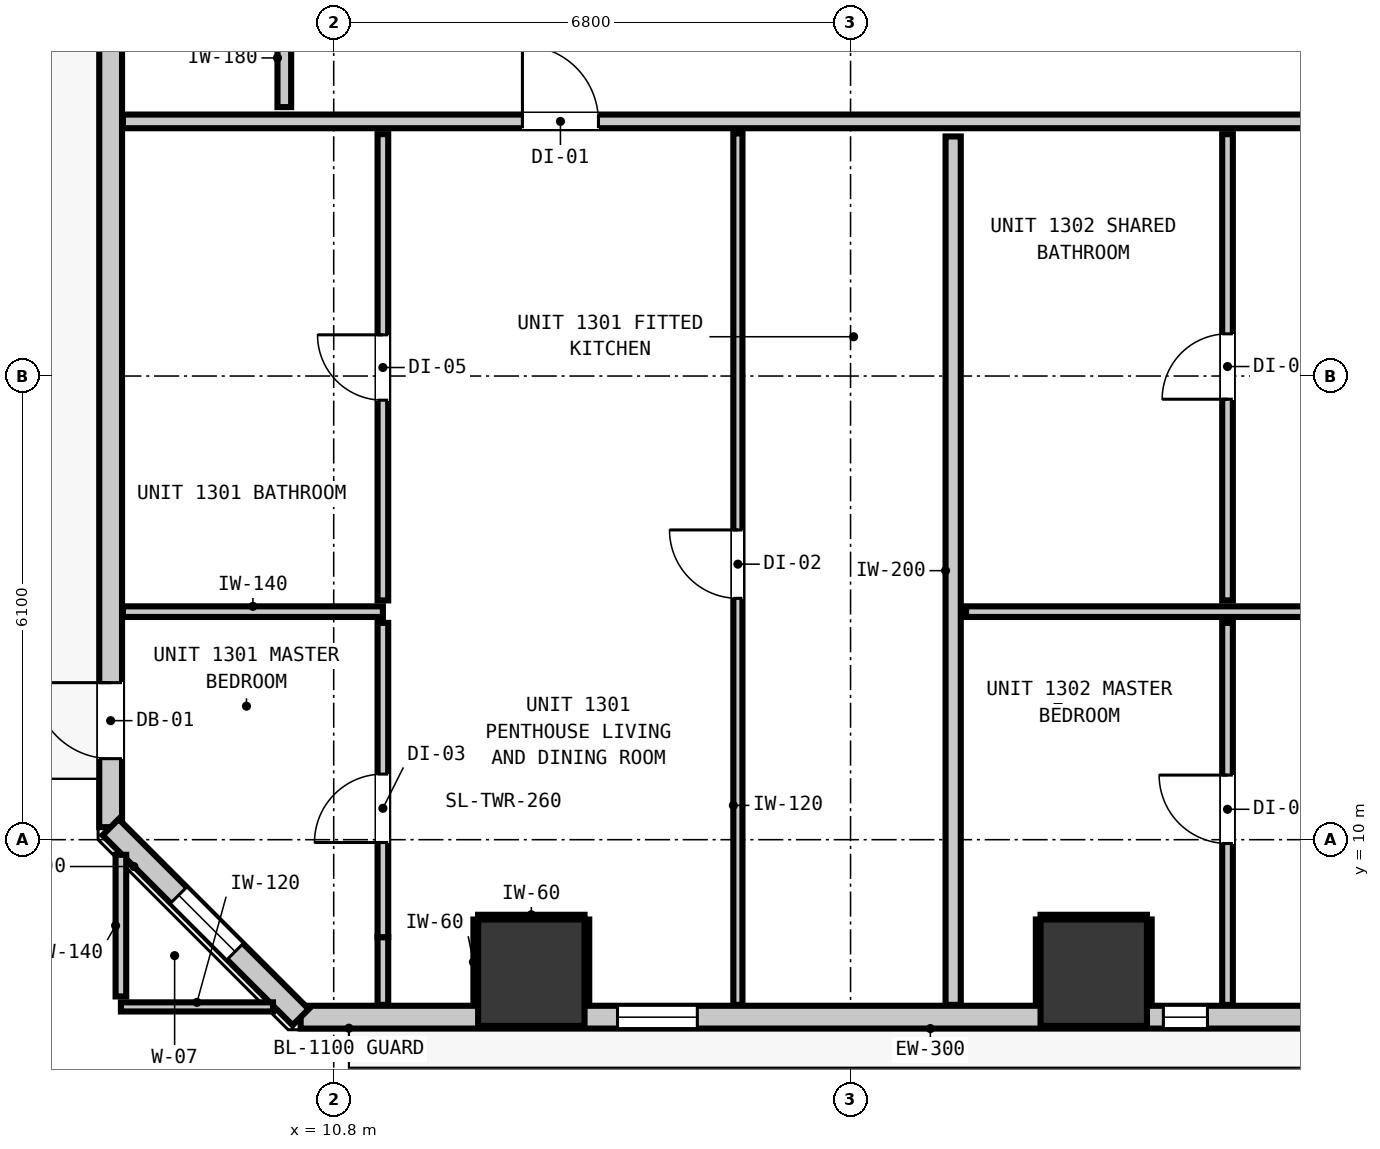
"""IFC4 building model, lengths in metres.
Left out: names, types, materials, properties, quantities, classifications, styles, units other than length and angle.
Written with IfcOpenShell. Run it as: python <this file> out.ifc"""

import sys

from ifc_helpers import new_model, si_unit, direction, frame, frame_2d, origin, origin_2d, place, context, subcontext, project, spatial, rectangle, extrude, element, fill, save


model = new_model("IFC4")
c1 = context("Model", 3, precision=1e-05, world=origin(), true_north=direction((0.0, 1.0)))
c2 = subcontext(c1, "Body", "Model", "MODEL_VIEW")
j1 = project(units=[si_unit("LENGTHUNIT", "METRE"), si_unit("PLANEANGLEUNIT", "RADIAN")], contexts=[c1])
p1 = place(None, origin())
s1 = spatial("IfcSite", under=j1, at=p1, CompositionType="ELEMENT")
p2 = place(p1, origin())
s2 = spatial("IfcBuilding", under=s1, at=p2, CompositionType="ELEMENT")
p3 = place(p2, frame((0.0, 0.0, 48.56)))
s3 = spatial("IfcBuildingStorey", under=s2, at=p3, CompositionType="ELEMENT", Elevation=48.56)
for number, where, z_axis, x_axis in (
    (1, (13.4, 8.25, 0.0), (0.0, 0.0, 1.0), (1.0, 0.0, 0.0)),
    (2, (20.8, 8.25, 0.0), (0.0, 0.0, 1.0), (1.0, 0.0, 0.0)),
):
    element("IfcColumn", number, at=place(p3, frame(where, z_axis=z_axis, x_axis=x_axis)), inside=s3, PredefinedType="COLUMN", context=c2, shape_type="SweptSolid", body=[
        extrude(rectangle(XDim=1.4, YDim=1.4, at=origin_2d()), origin(), (0.0, 0.0, 1.0), 3.32),
    ])
p4 = place(p3, frame((7.865, 10.165, 0.0), z_axis=(0.0, 0.0, 1.0), x_axis=(0.0, 1.0, 0.0)))
e3 = element("IfcWall", 3, at=p4, inside=s3, PredefinedType="STANDARD", context=c2, shape_type="SweptSolid", body=[
    extrude(rectangle(XDim=34.67, YDim=0.3, at=frame_2d((17.335, 0.0))), origin(), (0.0, 0.0, 1.0), 3.06),
])
p5 = place(p4, frame((0.901, 0.0, 0.0)))
e4 = element("IfcOpeningElement", 4, at=p5, cuts=e3, PredefinedType="OPENING", context=c2, shape_type="SweptSolid", body=[
    extrude(rectangle(XDim=1.0, YDim=2.15, at=frame_2d((0.5, 1.075))), frame((0.0, 0.16, 0.0), z_axis=(0.0, -1.0, 0.0), x_axis=(1.0, 0.0, 0.0)), (0.0, 0.0, 1.0), 0.32),
])
p6 = place(p3, frame((47.835, 7.665, 0.0), z_axis=(0.0, 0.0, 1.0), x_axis=(-1.0, 0.0, 0.0)))
e5 = element("IfcWall", 5, at=p6, inside=s3, PredefinedType="STANDARD", context=c2, shape_type="SweptSolid", body=[
    extrude(rectangle(XDim=37.47, YDim=0.3, at=frame_2d((18.735, 0.0))), origin(), (0.0, 0.0, 1.0), 3.06),
])
p7 = place(p6, frame((2.301, 0.0, 0.0)))
e6 = element("IfcOpeningElement", 6, at=p7, cuts=e5, PredefinedType="OPENING", context=c2, shape_type="SweptSolid", body=[
    extrude(rectangle(XDim=1.0, YDim=2.15, at=frame_2d((0.5, 1.075))), frame((0.0, 0.16, 0.0), z_axis=(0.0, -1.0, 0.0), x_axis=(1.0, 0.0, 0.0)), (0.0, 0.0, 1.0), 0.32),
])
p8 = place(p6, frame((32.251, 0.0, 0.85)))
e7 = element("IfcOpeningElement", 7, at=p8, cuts=e5, PredefinedType="OPENING", context=c2, shape_type="SweptSolid", body=[
    extrude(rectangle(XDim=1.05, YDim=1.65, at=frame_2d((0.525, 0.825))), frame((0.0, 0.16, 0.0), z_axis=(0.0, -1.0, 0.0), x_axis=(1.0, 0.0, 0.0)), (0.0, 0.0, 1.0), 0.32),
])
p9 = place(p6, frame((21.329, 0.0, 0.85)))
e8 = element("IfcOpeningElement", 8, at=p9, cuts=e5, PredefinedType="OPENING", context=c2, shape_type="SweptSolid", body=[
    extrude(rectangle(XDim=1.8, YDim=1.9, at=frame_2d((0.9, 0.95))), frame((0.0, 0.16, 0.0), z_axis=(0.0, -1.0, 0.0), x_axis=(1.0, 0.0, 0.0)), (0.0, 0.0, 1.0), 0.32),
])
p10 = place(p6, frame((25.539, 0.0, 0.85)))
e9 = element("IfcOpeningElement", 9, at=p10, cuts=e5, PredefinedType="OPENING", context=c2, shape_type="SweptSolid", body=[
    extrude(rectangle(XDim=0.58, YDim=1.5, at=frame_2d((0.29, 0.75))), frame((0.0, 0.16, 0.0), z_axis=(0.0, -1.0, 0.0), x_axis=(1.0, 0.0, 0.0)), (0.0, 0.0, 1.0), 0.32),
])
p11 = place(p6, frame((14.135, 0.0, 0.85)))
e10 = element("IfcOpeningElement", 10, at=p11, cuts=e5, PredefinedType="OPENING", context=c2, shape_type="SweptSolid", body=[
    extrude(rectangle(XDim=1.8, YDim=1.9, at=frame_2d((0.9, 0.95))), frame((0.0, 0.16, 0.0), z_axis=(0.0, -1.0, 0.0), x_axis=(1.0, 0.0, 0.0)), (0.0, 0.0, 1.0), 0.32),
])
p12 = place(p6, frame((5.562, 0.0, 0.85)))
e11 = element("IfcOpeningElement", 11, at=p12, cuts=e5, PredefinedType="OPENING", context=c2, shape_type="SweptSolid", body=[
    extrude(rectangle(XDim=1.8, YDim=1.9, at=frame_2d((0.9, 0.95))), frame((0.0, 0.16, 0.0), z_axis=(0.0, -1.0, 0.0), x_axis=(1.0, 0.0, 0.0)), (0.0, 0.0, 1.0), 0.32),
])
p13 = place(p6, frame((9.839, 0.0, 0.85)))
e12 = element("IfcOpeningElement", 12, at=p13, cuts=e5, PredefinedType="OPENING", context=c2, shape_type="SweptSolid", body=[
    extrude(rectangle(XDim=0.58, YDim=1.5, at=frame_2d((0.29, 0.75))), frame((0.0, 0.16, 0.0), z_axis=(0.0, -1.0, 0.0), x_axis=(1.0, 0.0, 0.0)), (0.0, 0.0, 1.0), 0.32),
])
p14 = place(p6, frame((0.364, 0.0, 0.85)))
e13 = element("IfcOpeningElement", 13, at=p14, cuts=e5, PredefinedType="OPENING", context=c2, shape_type="SweptSolid", body=[
    extrude(rectangle(XDim=1.05, YDim=1.65, at=frame_2d((0.525, 0.825))), frame((0.0, 0.16, 0.0), z_axis=(0.0, -1.0, 0.0), x_axis=(1.0, 0.0, 0.0)), (0.0, 0.0, 1.0), 0.32),
])
p15 = place(p3, frame((10.365, 7.665, 0.0), z_axis=(0.0, 0.0, 1.0), x_axis=(-0.707106781187, 0.707106781187, 0.0)))
e14 = element("IfcWall", 14, at=p15, inside=s3, PredefinedType="STANDARD", context=c2, shape_type="SweptSolid", body=[
    extrude(rectangle(XDim=3.536, YDim=0.3, at=frame_2d((1.768, 0.0))), origin(), (0.0, 0.0, 1.0), 3.06),
])
p16 = place(p15, frame((1.22, 0.0, 0.85)))
e15 = element("IfcOpeningElement", 15, at=p16, cuts=e14, PredefinedType="OPENING", context=c2, shape_type="SweptSolid", body=[
    extrude(rectangle(XDim=1.05, YDim=1.65, at=frame_2d((0.525, 0.825))), frame((0.0, 0.16, 0.0), z_axis=(0.0, -1.0, 0.0), x_axis=(1.0, 0.0, 0.0)), (0.0, 0.0, 1.0), 0.32),
])
p17 = place(p3, frame((8.027, 19.45, 0.0), z_axis=(0.0, 0.0, 1.0), x_axis=(1.0, 0.0, 0.0)))
e16 = element("IfcWall", 16, at=p17, inside=s3, PredefinedType="PARTITIONING", context=c2, shape_type="SweptSolid", body=[
    extrude(rectangle(XDim=42.146, YDim=0.18, at=frame_2d((21.073, 0.0))), origin(), (0.0, 0.0, 1.0), 3.06),
])
p18 = place(p17, frame((5.256, 0.0, 0.0)))
e17 = element("IfcOpeningElement", 17, at=p18, cuts=e16, PredefinedType="OPENING", context=c2, shape_type="SweptSolid", body=[
    extrude(rectangle(XDim=1.0, YDim=2.15, at=frame_2d((0.5, 1.075))), frame((0.0, 0.1, 0.0), z_axis=(0.0, -1.0, 0.0), x_axis=(1.0, 0.0, 0.0)), (0.0, 0.0, 1.0), 0.2),
])
p19 = place(p17, frame((18.169, 0.0, 0.0)))
e18 = element("IfcOpeningElement", 18, at=p19, cuts=e16, PredefinedType="OPENING", context=c2, shape_type="SweptSolid", body=[
    extrude(rectangle(XDim=1.0, YDim=2.15, at=frame_2d((0.5, 1.075))), frame((0.0, 0.1, 0.0), z_axis=(0.0, -1.0, 0.0), x_axis=(1.0, 0.0, 0.0)), (0.0, 0.0, 1.0), 0.2),
])
p20 = place(p17, frame((33.653, 0.0, 0.0)))
e19 = element("IfcOpeningElement", 19, at=p20, cuts=e16, PredefinedType="OPENING", context=c2, shape_type="SweptSolid", body=[
    extrude(rectangle(XDim=1.0, YDim=2.15, at=frame_2d((0.5, 1.075))), frame((0.0, 0.1, 0.0), z_axis=(0.0, -1.0, 0.0), x_axis=(1.0, 0.0, 0.0)), (0.0, 0.0, 1.0), 0.2),
])
p21 = place(p3, frame((8.027, 13.0, 0.0), z_axis=(0.0, 0.0, 1.0), x_axis=(1.0, 0.0, 0.0)))
e20 = element("IfcWall", 20, at=p21, inside=s3, PredefinedType="PARTITIONING", context=c2, shape_type="SweptSolid", body=[
    extrude(rectangle(XDim=3.42, YDim=0.14, at=frame_2d((1.71, 0.0))), origin(), (0.0, 0.0, 1.0), 3.06),
])
p22 = place(p3, frame((19.12, 13.0, 0.0), z_axis=(0.0, 0.0, 1.0), x_axis=(1.0, 0.0, 0.0)))
e21 = element("IfcWall", 21, at=p22, inside=s3, PredefinedType="PARTITIONING", context=c2, shape_type="SweptSolid", body=[
    extrude(rectangle(XDim=31.053, YDim=0.14, at=frame_2d((15.526, 0.0))), origin(), (0.0, 0.0, 1.0), 3.06),
])
p23 = place(p22, frame((7.126, 0.0, 0.0)))
e22 = element("IfcOpeningElement", 22, at=p23, cuts=e21, PredefinedType="OPENING", context=c2, shape_type="SweptSolid", body=[
    extrude(rectangle(XDim=0.9, YDim=2.1, at=frame_2d((0.45, 1.05))), frame((0.0, 0.08, 0.0), z_axis=(0.0, -1.0, 0.0), x_axis=(1.0, 0.0, 0.0)), (0.0, 0.0, 1.0), 0.16),
])
p24 = place(p22, frame((22.609, 0.0, 0.0)))
e23 = element("IfcOpeningElement", 23, at=p24, cuts=e21, PredefinedType="OPENING", context=c2, shape_type="SweptSolid", body=[
    extrude(rectangle(XDim=0.9, YDim=2.1, at=frame_2d((0.45, 1.05))), frame((0.0, 0.08, 0.0), z_axis=(0.0, -1.0, 0.0), x_axis=(1.0, 0.0, 0.0)), (0.0, 0.0, 1.0), 0.16),
])
p25 = place(p3, frame((8.0, 7.8, 0.0), z_axis=(0.0, 0.0, 1.0), x_axis=(1.0, 0.0, 0.0)))
e24 = element("IfcWall", 24, at=p25, inside=s3, PredefinedType="PARTITIONING", context=c2, shape_type="SweptSolid", body=[
    extrude(rectangle(XDim=2.001, YDim=0.12, at=frame_2d((1.0, 0.0))), origin(), (0.0, 0.0, 1.0), 3.06),
])
p26 = place(p3, frame((18.95, 7.827, 0.0), z_axis=(0.0, 0.0, 1.0), x_axis=(0.0, 1.0, 0.0)))
e25 = element("IfcWall", 25, at=p26, inside=s3, PredefinedType="PARTITIONING", context=c2, shape_type="SweptSolid", body=[
    extrude(rectangle(XDim=11.425, YDim=0.2, at=frame_2d((5.712, 0.0))), origin(), (0.0, 0.0, 1.0), 3.06),
])
p27 = place(p3, frame((10.15, 19.638, 0.0), z_axis=(0.0, 0.0, 1.0), x_axis=(0.0, 1.0, 0.0)))
e26 = element("IfcWall", 26, at=p27, inside=s3, PredefinedType="PARTITIONING", context=c2, shape_type="SweptSolid", body=[
    extrude(rectangle(XDim=1.294, YDim=0.18, at=frame_2d((0.647, 0.0))), origin(), (0.0, 0.0, 1.0), 3.06),
])
p28 = place(p3, frame((8.0, 7.938, 0.0), z_axis=(0.0, 0.0, 1.0), x_axis=(0.0, 1.0, 0.0)))
e27 = element("IfcWall", 27, at=p28, inside=s3, PredefinedType="PARTITIONING", context=c2, shape_type="SweptSolid", body=[
    extrude(rectangle(XDim=1.863, YDim=0.14, at=frame_2d((0.932, 0.0))), origin(), (0.0, 0.0, 1.0), 3.06),
])
p29 = place(p3, frame((11.447, 7.827, 0.0), z_axis=(0.0, 0.0, 1.0), x_axis=(0.0, 1.0, 0.0)))
e28 = element("IfcWall", 28, at=p29, inside=s3, PredefinedType="PARTITIONING", context=c2, shape_type="SweptSolid", body=[
    extrude(rectangle(XDim=0.891, YDim=0.14, at=frame_2d((0.446, 0.0))), origin(), (0.0, 0.0, 1.0), 3.06),
])
p30 = place(p3, frame((11.447, 8.718, 0.0), z_axis=(0.0, 0.0, 1.0), x_axis=(0.0, 1.0, 0.0)))
e29 = element("IfcWall", 29, at=p30, inside=s3, PredefinedType="PARTITIONING", context=c2, shape_type="SweptSolid", body=[
    extrude(rectangle(XDim=4.134, YDim=0.14, at=frame_2d((2.067, 0.0))), origin(), (0.0, 0.0, 1.0), 2.445),
])
p31 = place(p30, frame((1.245, 0.0, 0.0)))
e30 = element("IfcOpeningElement", 30, at=p31, cuts=e29, PredefinedType="OPENING", context=c2, shape_type="SweptSolid", body=[
    extrude(rectangle(XDim=0.9, YDim=2.1, at=frame_2d((0.45, 1.05))), frame((0.0, 0.08, 0.0), z_axis=(0.0, -1.0, 0.0), x_axis=(1.0, 0.0, 0.0)), (0.0, 0.0, 1.0), 0.16),
])
p32 = place(p3, frame((11.447, 13.148, 0.0), z_axis=(0.0, 0.0, 1.0), x_axis=(0.0, 1.0, 0.0)))
e31 = element("IfcWall", 31, at=p32, inside=s3, PredefinedType="PARTITIONING", context=c2, shape_type="SweptSolid", body=[
    extrude(rectangle(XDim=6.134, YDim=0.14, at=frame_2d((3.067, 0.0))), origin(), (0.0, 0.0, 1.0), 2.445),
])
p33 = place(p32, frame((2.634, 0.0, 0.0)))
e32 = element("IfcOpeningElement", 32, at=p33, cuts=e31, PredefinedType="OPENING", context=c2, shape_type="SweptSolid", body=[
    extrude(rectangle(XDim=0.86, YDim=2.02, at=frame_2d((0.43, 1.01))), frame((0.0, 0.08, 0.0), z_axis=(0.0, -1.0, 0.0), x_axis=(1.0, 0.0, 0.0)), (0.0, 0.0, 1.0), 0.16),
])
p34 = place(p3, frame((22.56, 7.827, 0.0), z_axis=(0.0, 0.0, 1.0), x_axis=(0.0, 1.0, 0.0)))
e33 = element("IfcWall", 33, at=p34, inside=s3, PredefinedType="PARTITIONING", context=c2, shape_type="SweptSolid", body=[
    extrude(rectangle(XDim=5.025, YDim=0.14, at=frame_2d((2.513, 0.0))), origin(), (0.0, 0.0, 1.0), 3.06),
])
p35 = place(p34, frame((2.123, 0.0, 0.0)))
e34 = element("IfcOpeningElement", 34, at=p35, cuts=e33, PredefinedType="OPENING", context=c2, shape_type="SweptSolid", body=[
    extrude(rectangle(XDim=0.9, YDim=2.1, at=frame_2d((0.45, 1.05))), frame((0.0, 0.08, 0.0), z_axis=(0.0, -1.0, 0.0), x_axis=(1.0, 0.0, 0.0)), (0.0, 0.0, 1.0), 0.16),
])
p36 = place(p3, frame((22.56, 13.148, 0.0), z_axis=(0.0, 0.0, 1.0), x_axis=(0.0, 1.0, 0.0)))
e35 = element("IfcWall", 35, at=p36, inside=s3, PredefinedType="PARTITIONING", context=c2, shape_type="SweptSolid", body=[
    extrude(rectangle(XDim=6.134, YDim=0.14, at=frame_2d((3.067, 0.0))), origin(), (0.0, 0.0, 1.0), 3.06),
])
p37 = place(p36, frame((2.647, 0.0, 0.0)))
e36 = element("IfcOpeningElement", 36, at=p37, cuts=e35, PredefinedType="OPENING", context=c2, shape_type="SweptSolid", body=[
    extrude(rectangle(XDim=0.86, YDim=2.02, at=frame_2d((0.43, 1.01))), frame((0.0, 0.08, 0.0), z_axis=(0.0, -1.0, 0.0), x_axis=(1.0, 0.0, 0.0)), (0.0, 0.0, 1.0), 0.16),
])
p38 = place(p3, frame((16.118, 7.827, 0.0), z_axis=(0.0, 0.0, 1.0), x_axis=(0.0, 1.0, 0.0)))
e37 = element("IfcWall", 37, at=p38, inside=s3, PredefinedType="PARTITIONING", context=c2, shape_type="SweptSolid", body=[
    extrude(rectangle(XDim=11.465, YDim=0.12, at=frame_2d((5.732, 0.0))), origin(), (0.0, 0.0, 1.0), 3.06),
])
p39 = place(p38, frame((5.348, 0.0, 0.0)))
e38 = element("IfcOpeningElement", 38, at=p39, cuts=e37, PredefinedType="OPENING", context=c2, shape_type="SweptSolid", body=[
    extrude(rectangle(XDim=0.9, YDim=2.1, at=frame_2d((0.45, 1.05))), frame((0.0, 0.07, 0.0), z_axis=(0.0, -1.0, 0.0), x_axis=(1.0, 0.0, 0.0)), (0.0, 0.0, 1.0), 0.14),
])
p40 = place(p3, frame((12.7, 8.982, 0.0), z_axis=(0.0, 0.0, 1.0), x_axis=(1.0, 0.0, 0.0)))
e39 = element("IfcWall", 39, at=p40, inside=s3, PredefinedType="PARTITIONING", context=c2, shape_type="SweptSolid", body=[
    extrude(rectangle(XDim=1.4, YDim=0.06, at=frame_2d((0.7, 0.0))), origin(), (0.0, 0.0, 1.0), 1.45),
])
for number, where, z_axis, x_axis in (
    (40, (12.668, 7.83, 0.0), (0.0, 0.0, 1.0), (0.0, 1.0, 0.0)),
    (41, (14.132, 7.83, 0.0), (0.0, 0.0, 1.0), (0.0, 1.0, 0.0)),
):
    element("IfcWall", number, at=place(p3, frame(where, z_axis=z_axis, x_axis=x_axis)), inside=s3, PredefinedType="PARTITIONING", context=c2, shape_type="SweptSolid", body=[
        extrude(rectangle(XDim=1.12, YDim=0.06, at=frame_2d((0.56, 0.0))), origin(), (0.0, 0.0, 1.0), 1.45),
    ])
p41 = place(p3, frame((20.1, 8.982, 0.0), z_axis=(0.0, 0.0, 1.0), x_axis=(1.0, 0.0, 0.0)))
e42 = element("IfcWall", 42, at=p41, inside=s3, PredefinedType="PARTITIONING", context=c2, shape_type="SweptSolid", body=[
    extrude(rectangle(XDim=1.4, YDim=0.06, at=frame_2d((0.7, 0.0))), origin(), (0.0, 0.0, 1.0), 1.45),
])
for number, where, z_axis, x_axis in (
    (43, (20.068, 7.83, 0.0), (0.0, 0.0, 1.0), (0.0, 1.0, 0.0)),
    (44, (21.532, 7.83, 0.0), (0.0, 0.0, 1.0), (0.0, 1.0, 0.0)),
):
    element("IfcWall", number, at=place(p3, frame(where, z_axis=z_axis, x_axis=x_axis)), inside=s3, PredefinedType="PARTITIONING", context=c2, shape_type="SweptSolid", body=[
        extrude(rectangle(XDim=1.12, YDim=0.06, at=frame_2d((0.56, 0.0))), origin(), (0.0, 0.0, 1.0), 1.45),
    ])
p42 = place(p5, origin())
e45 = element("IfcDoor", 45, at=p42, inside=s3, OperationType="SINGLE_SWING_RIGHT", PredefinedType="DOOR", context=c2, shape_type="SweptSolid", body=[
    extrude(rectangle(XDim=1.0, YDim=2.15, at=frame_2d((0.5, 1.075))), frame((0.0, 0.025, 0.0), z_axis=(0.0, -1.0, 0.0), x_axis=(1.0, 0.0, 0.0)), (0.0, 0.0, 1.0), 0.05),
])
fill(e4, e45)
p43 = place(p8, origin())
e46 = element("IfcWindow", 46, at=p43, inside=s3, PartitioningType="SINGLE_PANEL", PredefinedType="WINDOW", context=c2, shape_type="SweptSolid", body=[
    extrude(rectangle(XDim=1.05, YDim=1.65, at=frame_2d((0.525, 0.825))), frame((0.0, 0.03, 0.0), z_axis=(0.0, -1.0, 0.0), x_axis=(1.0, 0.0, 0.0)), (0.0, 0.0, 1.0), 0.06),
])
fill(e7, e46)
p44 = place(p10, origin())
e47 = element("IfcWindow", 47, at=p44, inside=s3, PartitioningType="SINGLE_PANEL", PredefinedType="WINDOW", context=c2, shape_type="SweptSolid", body=[
    extrude(rectangle(XDim=0.58, YDim=1.5, at=frame_2d((0.29, 0.75))), frame((0.0, 0.03, 0.0), z_axis=(0.0, -1.0, 0.0), x_axis=(1.0, 0.0, 0.0)), (0.0, 0.0, 1.0), 0.06),
])
fill(e9, e47)
p45 = place(p16, origin())
e48 = element("IfcWindow", 48, at=p45, inside=s3, PartitioningType="SINGLE_PANEL", PredefinedType="WINDOW", context=c2, shape_type="SweptSolid", body=[
    extrude(rectangle(XDim=1.05, YDim=1.65, at=frame_2d((0.525, 0.825))), frame((0.0, 0.03, 0.0), z_axis=(0.0, -1.0, 0.0), x_axis=(1.0, 0.0, 0.0)), (0.0, 0.0, 1.0), 0.06),
])
fill(e15, e48)
p46 = place(p18, origin())
e49 = element("IfcDoor", 49, at=p46, inside=s3, OperationType="SINGLE_SWING_LEFT", PredefinedType="DOOR", context=c2, shape_type="SweptSolid", body=[
    extrude(rectangle(XDim=1.0, YDim=2.15, at=frame_2d((0.5, 1.075))), frame((0.0, 0.025, 0.0), z_axis=(0.0, -1.0, 0.0), x_axis=(1.0, 0.0, 0.0)), (0.0, 0.0, 1.0), 0.05),
])
fill(e17, e49)
p47 = place(p33, origin())
e50 = element("IfcDoor", 50, at=p47, inside=s3, OperationType="SINGLE_SWING_RIGHT", PredefinedType="DOOR", context=c2, shape_type="SweptSolid", body=[
    extrude(rectangle(XDim=0.86, YDim=2.02, at=frame_2d((0.43, 1.01))), frame((0.0, 0.025, 0.0), z_axis=(0.0, -1.0, 0.0), x_axis=(1.0, 0.0, 0.0)), (0.0, 0.0, 1.0), 0.05),
])
fill(e32, e50)
p48 = place(p31, origin())
e51 = element("IfcDoor", 51, at=p48, inside=s3, OperationType="SINGLE_SWING_LEFT", PredefinedType="DOOR", context=c2, shape_type="SweptSolid", body=[
    extrude(rectangle(XDim=0.9, YDim=2.1, at=frame_2d((0.45, 1.05))), frame((0.0, 0.025, 0.0), z_axis=(0.0, -1.0, 0.0), x_axis=(1.0, 0.0, 0.0)), (0.0, 0.0, 1.0), 0.05),
])
fill(e30, e51)
p49 = place(p39, origin())
e52 = element("IfcDoor", 52, at=p49, inside=s3, OperationType="SINGLE_SWING_RIGHT", PredefinedType="DOOR", context=c2, shape_type="SweptSolid", body=[
    extrude(rectangle(XDim=0.9, YDim=2.1, at=frame_2d((0.45, 1.05))), frame((0.0, 0.025, 0.0), z_axis=(0.0, -1.0, 0.0), x_axis=(1.0, 0.0, 0.0)), (0.0, 0.0, 1.0), 0.05),
])
fill(e38, e52)
p50 = place(p37, origin())
e53 = element("IfcDoor", 53, at=p50, inside=s3, OperationType="SINGLE_SWING_LEFT", PredefinedType="DOOR", context=c2, shape_type="SweptSolid", body=[
    extrude(rectangle(XDim=0.86, YDim=2.02, at=frame_2d((0.43, 1.01))), frame((0.0, 0.025, 0.0), z_axis=(0.0, -1.0, 0.0), x_axis=(1.0, 0.0, 0.0)), (0.0, 0.0, 1.0), 0.05),
])
fill(e36, e53)
p51 = place(p35, origin())
e54 = element("IfcDoor", 54, at=p51, inside=s3, OperationType="SINGLE_SWING_RIGHT", PredefinedType="DOOR", context=c2, shape_type="SweptSolid", body=[
    extrude(rectangle(XDim=0.9, YDim=2.1, at=frame_2d((0.45, 1.05))), frame((0.0, 0.025, 0.0), z_axis=(0.0, -1.0, 0.0), x_axis=(1.0, 0.0, 0.0)), (0.0, 0.0, 1.0), 0.05),
])
fill(e34, e54)
save(model, sys.argv[1])
